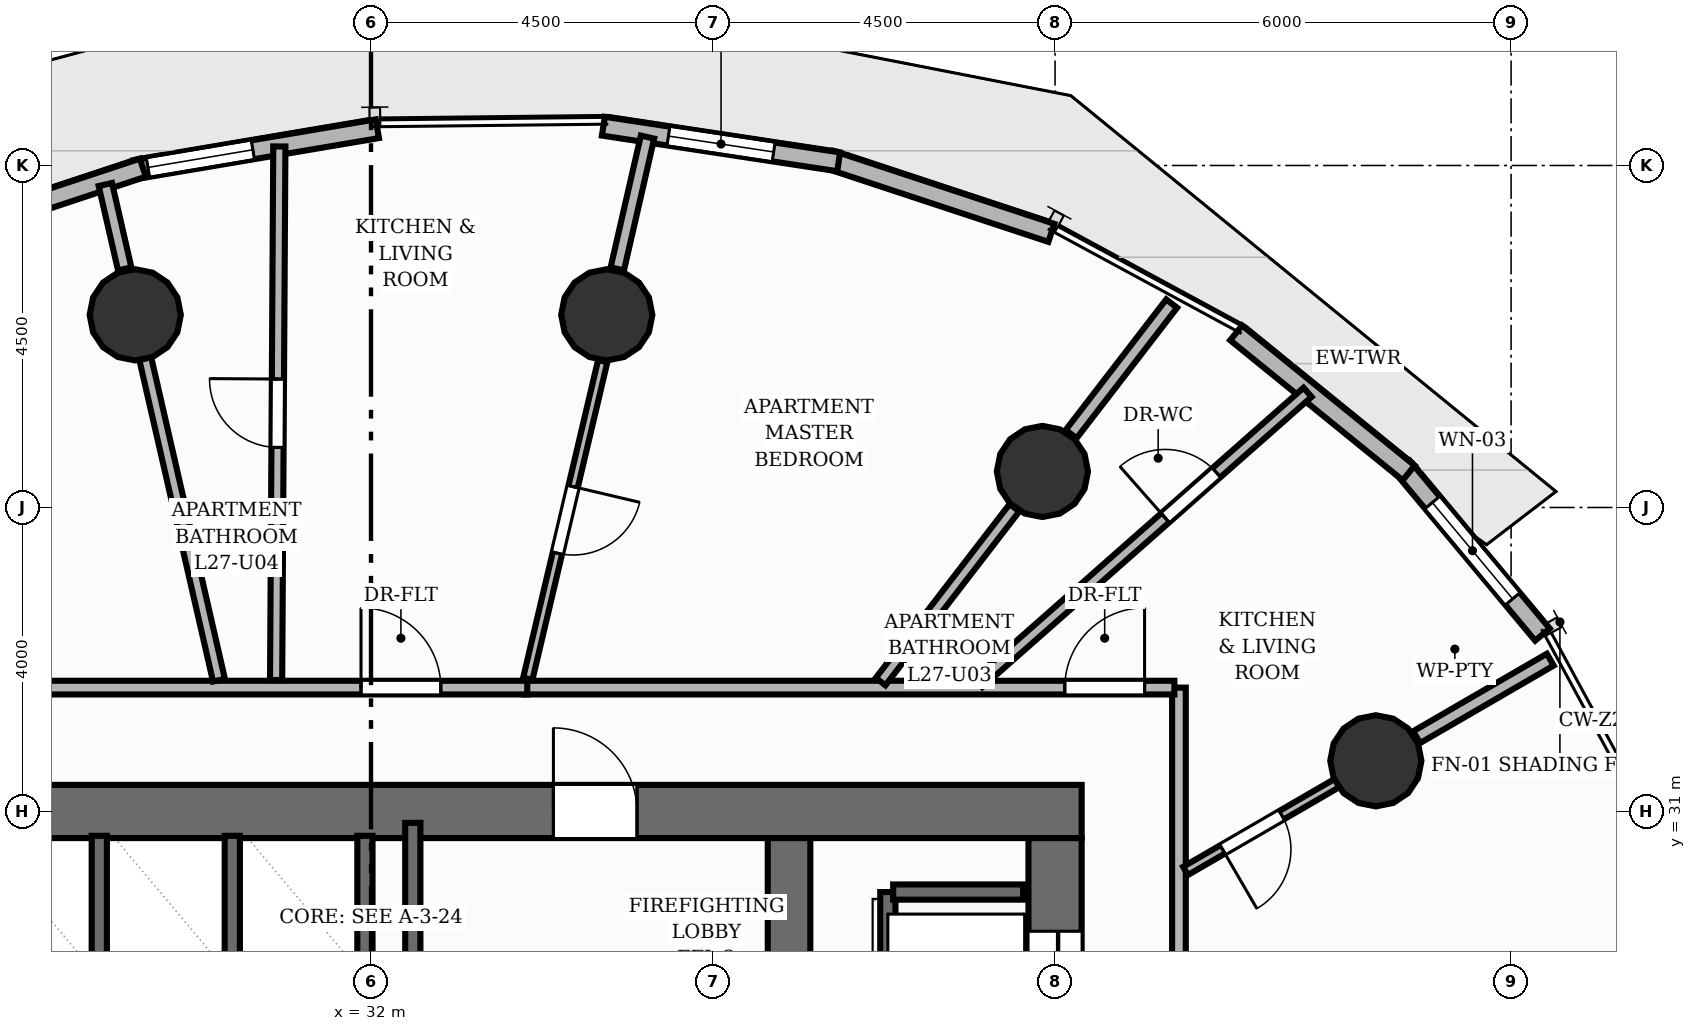
"""IFC4 building model, lengths in metres.
Left out: names, types, materials, properties, quantities, classifications, styles, units other than length and angle.
Written with IfcOpenShell. Run it as: python <this file> out.ifc"""

import sys

from ifc_helpers import new_model, si_unit, direction, frame, frame_2d, origin, origin_2d, place, context, subcontext, project, spatial, rectangle, circle, extrude, element, fill, save


model = new_model("IFC4")
c1 = context("Model", 3, precision=1e-05, world=origin(), true_north=direction((0.0, 1.0)))
c2 = subcontext(c1, "Body", "Model", "MODEL_VIEW")
j1 = project(units=[si_unit("LENGTHUNIT", "METRE"), si_unit("PLANEANGLEUNIT", "RADIAN")], contexts=[c1])
p1 = place(None, origin())
s1 = spatial("IfcSite", under=j1, at=p1, CompositionType="ELEMENT")
p2 = place(p1, origin())
s2 = spatial("IfcBuilding", under=s1, at=p2, CompositionType="ELEMENT")
p3 = place(p2, frame((0.0, 0.0, 93.28)))
s3 = spatial("IfcBuildingStorey", under=s2, at=p3, CompositionType="ELEMENT", Elevation=93.28)
p4 = place(p3, frame((22.65, 31.0, 0.0), z_axis=(0.0, 0.0, 1.0), x_axis=(1.0, 0.0, 0.0)))
e1 = element("IfcWall", 1, at=p4, inside=s3, PredefinedType="SHEAR", context=c2, shape_type="SweptSolid", body=[
    extrude(rectangle(XDim=18.7, YDim=0.7, at=frame_2d((9.35, 0.0))), origin(), (0.0, 0.0, 1.0), 3.2),
])
p5 = place(p4, frame((11.75, 0.0, 0.0)))
e2 = element("IfcOpeningElement", 2, at=p5, cuts=e1, PredefinedType="OPENING", context=c2, shape_type="SweptSolid", body=[
    extrude(rectangle(XDim=1.1, YDim=2.15, at=frame_2d((0.55, 1.075))), frame((0.0, 0.36, 0.0), z_axis=(0.0, -1.0, 0.0), x_axis=(1.0, 0.0, 0.0)), (0.0, 0.0, 1.0), 0.72),
])
p6 = place(p3, frame((41.0, 17.35, 0.0), z_axis=(0.0, 0.0, 1.0), x_axis=(0.0, 1.0, 0.0)))
e3 = element("IfcWall", 3, at=p6, inside=s3, PredefinedType="SHEAR", context=c2, shape_type="SweptSolid", body=[
    extrude(rectangle(XDim=13.3, YDim=0.7, at=frame_2d((6.65, 0.0))), origin(), (0.0, 0.0, 1.0), 3.2),
])
p7 = place(p6, frame((1.225, 0.0, 0.0)))
e4 = element("IfcOpeningElement", 4, at=p7, cuts=e3, PredefinedType="OPENING", context=c2, shape_type="SweptSolid", body=[
    extrude(rectangle(XDim=1.05, YDim=2.15, at=frame_2d((0.525, 1.075))), frame((0.0, 0.36, 0.0), z_axis=(0.0, -1.0, 0.0), x_axis=(1.0, 0.0, 0.0)), (0.0, 0.0, 1.0), 0.72),
])
p8 = place(p6, frame((4.475, 0.0, 0.0)))
e5 = element("IfcOpeningElement", 5, at=p8, cuts=e3, PredefinedType="OPENING", context=c2, shape_type="SweptSolid", body=[
    extrude(rectangle(XDim=1.05, YDim=2.15, at=frame_2d((0.525, 1.075))), frame((0.0, 0.36, 0.0), z_axis=(0.0, -1.0, 0.0), x_axis=(1.0, 0.0, 0.0)), (0.0, 0.0, 1.0), 0.72),
])
p9 = place(p6, frame((7.775, 0.0, 0.0)))
e6 = element("IfcOpeningElement", 6, at=p9, cuts=e3, PredefinedType="OPENING", context=c2, shape_type="SweptSolid", body=[
    extrude(rectangle(XDim=1.05, YDim=2.15, at=frame_2d((0.525, 1.075))), frame((0.0, 0.36, 0.0), z_axis=(0.0, -1.0, 0.0), x_axis=(1.0, 0.0, 0.0)), (0.0, 0.0, 1.0), 0.72),
])
p10 = place(p6, frame((11.025, 0.0, 0.0)))
e7 = element("IfcOpeningElement", 7, at=p10, cuts=e3, PredefinedType="OPENING", context=c2, shape_type="SweptSolid", body=[
    extrude(rectangle(XDim=1.05, YDim=2.15, at=frame_2d((0.525, 1.075))), frame((0.0, 0.36, 0.0), z_axis=(0.0, -1.0, 0.0), x_axis=(1.0, 0.0, 0.0)), (0.0, 0.0, 1.0), 0.72),
])
p11 = place(p3, frame((37.5, 17.35, 0.0), z_axis=(0.0, 0.0, 1.0), x_axis=(0.0, 1.0, 0.0)))
e8 = element("IfcWall", 8, at=p11, inside=s3, PredefinedType="SHEAR", context=c2, shape_type="SweptSolid", body=[
    extrude(rectangle(XDim=13.3, YDim=0.56, at=frame_2d((6.65, 0.0))), origin(), (0.0, 0.0, 1.0), 3.2),
])
for number, where, z_axis, x_axis in (
    (9, (45.22, 31.667, 0.0), (0.0, 0.0, 1.0), (1.0, 0.0, 0.0)),
    (10, (40.833, 35.474, 0.0), (0.0, 0.0, 1.0), (1.0, 0.0, 0.0)),
    (11, (35.102, 37.535, 0.0), (0.0, 0.0, 1.0), (1.0, 0.0, 0.0)),
    (12, (28.898, 37.535, 0.0), (0.0, 0.0, 1.0), (1.0, 0.0, 0.0)),
):
    element("IfcColumn", number, at=place(p3, frame(where, z_axis=z_axis, x_axis=x_axis)), inside=s3, PredefinedType="COLUMN", context=c2, shape_type="SweptSolid", body=[
        extrude(circle(Radius=0.6, at=origin_2d()), origin(), (0.0, 0.0, 1.0), 3.2),
    ])
p12 = place(p3, frame((45.572, 35.535, 0.0), z_axis=(0.0, 0.0, 1.0), x_axis=(0.640518566271, -0.76794268423, 0.0)))
e13 = element("IfcWall", 13, at=p12, inside=s3, PredefinedType="SOLIDWALL", context=c2, shape_type="SweptSolid", body=[
    extrude(rectangle(XDim=2.874, YDim=0.25, at=frame_2d((1.437, 0.0))), origin(), (0.0, 0.0, 1.0), 2.96),
])
p13 = place(p12, frame((0.612, 0.0, 0.85)))
e14 = element("IfcOpeningElement", 14, at=p13, cuts=e13, PredefinedType="OPENING", context=c2, shape_type="SweptSolid", body=[
    extrude(rectangle(XDim=1.65, YDim=1.55, at=frame_2d((0.825, 0.775))), frame((0.0, 0.135, 0.0), z_axis=(0.0, -1.0, 0.0), x_axis=(1.0, 0.0, 0.0)), (0.0, 0.0, 1.0), 0.27),
])
p14 = place(p3, frame((43.383, 37.298, 0.0), z_axis=(0.0, 0.0, 1.0), x_axis=(0.776285131062, -0.630381943976, 0.0)))
e15 = element("IfcWall", 15, at=p14, inside=s3, PredefinedType="SOLIDWALL", context=c2, shape_type="SweptSolid", body=[
    extrude(rectangle(XDim=2.923, YDim=0.25, at=frame_2d((1.462, 0.0))), origin(), (0.0, 0.0, 1.0), 2.96),
])
p15 = place(p3, frame((38.045, 39.574, 0.0), z_axis=(0.0, 0.0, 1.0), x_axis=(0.949533409058, -0.313665913166, 0.0)))
e16 = element("IfcWall", 16, at=p15, inside=s3, PredefinedType="SOLIDWALL", context=c2, shape_type="SweptSolid", body=[
    extrude(rectangle(XDim=3.061, YDim=0.25, at=frame_2d((1.53, 0.0))), origin(), (0.0, 0.0, 1.0), 2.96),
])
p16 = place(p3, frame((35.057, 40.017, 0.0), z_axis=(0.0, 0.0, 1.0), x_axis=(0.988719703222, -0.149777663425, 0.0)))
e17 = element("IfcWall", 17, at=p16, inside=s3, PredefinedType="SOLIDWALL", context=c2, shape_type="SweptSolid", body=[
    extrude(rectangle(XDim=3.131, YDim=0.25, at=frame_2d((1.566, 0.0))), origin(), (0.0, 0.0, 1.0), 2.96),
])
p17 = place(p16, frame((0.866, 0.0, 0.85)))
e18 = element("IfcOpeningElement", 18, at=p17, cuts=e17, PredefinedType="OPENING", context=c2, shape_type="SweptSolid", body=[
    extrude(rectangle(XDim=1.4, YDim=1.37, at=frame_2d((0.7, 0.685))), frame((0.0, 0.135, 0.0), z_axis=(0.0, -1.0, 0.0), x_axis=(1.0, 0.0, 0.0)), (0.0, 0.0, 1.0), 0.27),
])
p18 = place(p3, frame((28.893, 39.445, 0.0), z_axis=(0.0, 0.0, 1.0), x_axis=(0.986043062305, 0.166490478044, 0.0)))
e19 = element("IfcWall", 19, at=p18, inside=s3, PredefinedType="SOLIDWALL", context=c2, shape_type="SweptSolid", body=[
    extrude(rectangle(XDim=3.236, YDim=0.25, at=frame_2d((1.618, 0.0))), origin(), (0.0, 0.0, 1.0), 2.96),
])
p19 = place(p18, frame((0.175, 0.0, 0.85)))
e20 = element("IfcOpeningElement", 20, at=p19, cuts=e19, PredefinedType="OPENING", context=c2, shape_type="SweptSolid", body=[
    extrude(rectangle(XDim=1.4, YDim=1.55, at=frame_2d((0.7, 0.775))), frame((0.0, 0.135, 0.0), z_axis=(0.0, -1.0, 0.0), x_axis=(1.0, 0.0, 0.0)), (0.0, 0.0, 1.0), 0.27),
])
p20 = place(p3, frame((25.904, 38.445, 0.0), z_axis=(0.0, 0.0, 1.0), x_axis=(0.949206293356, 0.314654433709, 0.0)))
e21 = element("IfcWall", 21, at=p20, inside=s3, PredefinedType="SOLIDWALL", context=c2, shape_type="SweptSolid", body=[
    extrude(rectangle(XDim=3.26, YDim=0.25, at=frame_2d((1.63, 0.0))), origin(), (0.0, 0.0, 1.0), 2.96),
])
p21 = place(p3, frame((32.55, 27.35, 0.0), z_axis=(0.0, 0.0, 1.0), x_axis=(0.0, 1.0, 0.0)))
e22 = element("IfcWall", 22, at=p21, inside=s3, PredefinedType="SHEAR", context=c2, shape_type="SweptSolid", body=[
    extrude(rectangle(XDim=3.5, YDim=0.2, at=frame_2d((1.75, 0.0))), origin(), (0.0, 0.0, 1.0), 3.2),
])
p22 = place(p3, frame((38.8, 18.06, 0.0), z_axis=(0.0, 0.0, 1.0), x_axis=(0.0, 1.0, 0.0)))
e23 = element("IfcWall", 23, at=p22, inside=s3, PredefinedType="SHEAR", context=c2, shape_type="SweptSolid", body=[
    extrude(rectangle(XDim=11.88, YDim=0.2, at=frame_2d((5.94, 0.0))), origin(), (0.0, 0.0, 1.0), 3.2),
])
p23 = place(p3, frame((38.87, 29.94, 0.0), z_axis=(0.0, 0.0, 1.0), x_axis=(1.0, 0.0, 0.0)))
e24 = element("IfcWall", 24, at=p23, inside=s3, PredefinedType="SHEAR", context=c2, shape_type="SweptSolid", body=[
    extrude(rectangle(XDim=1.71, YDim=0.2, at=frame_2d((0.855, 0.0))), origin(), (0.0, 0.0, 1.0), 3.2),
])
for number, where, z_axis, x_axis in (
    (25, (31.92, 29.02, 0.0), (0.0, 0.0, 1.0), (0.0, 1.0, 0.0)),
    (26, (28.425, 29.02, 0.0), (0.0, 0.0, 1.0), (0.0, 1.0, 0.0)),
    (27, (30.175, 29.02, 0.0), (0.0, 0.0, 1.0), (0.0, 1.0, 0.0)),
):
    element("IfcWall", number, at=place(p3, frame(where, z_axis=z_axis, x_axis=x_axis)), inside=s3, PredefinedType="SHEAR", context=c2, shape_type="SweptSolid", body=[
        extrude(rectangle(XDim=1.66, YDim=0.2, at=frame_2d((0.83, 0.0))), origin(), (0.0, 0.0, 1.0), 3.2),
    ])
p24 = place(p3, frame((45.757, 31.978, 0.0), z_axis=(0.0, 0.0, 1.0), x_axis=(0.865025978628, 0.501727073516, 0.0)))
e28 = element("IfcWall", 28, at=p24, inside=s3, PredefinedType="PARTITIONING", context=c2, shape_type="SweptSolid", body=[
    extrude(rectangle(XDim=2.033, YDim=0.18, at=frame_2d((1.017, 0.0))), origin(), (0.0, 0.0, 1.0), 2.26),
])
p25 = place(p3, frame((41.212, 35.966, 0.0), z_axis=(0.0, 0.0, 1.0), x_axis=(0.610026423006, 0.792381071981, 0.0)))
e29 = element("IfcWall", 29, at=p25, inside=s3, PredefinedType="PARTITIONING", context=c2, shape_type="SweptSolid", body=[
    extrude(rectangle(XDim=2.167, YDim=0.18, at=frame_2d((1.084, 0.0))), origin(), (0.0, 0.0, 1.0), 2.26),
])
p26 = place(p3, frame((35.24, 38.139, 0.0), z_axis=(0.0, 0.0, 1.0), x_axis=(0.223406034992, 0.974725470853, 0.0)))
e30 = element("IfcWall", 30, at=p26, inside=s3, PredefinedType="PARTITIONING", context=c2, shape_type="SweptSolid", body=[
    extrude(rectangle(XDim=1.779, YDim=0.18, at=frame_2d((0.89, 0.0))), origin(), (0.0, 0.0, 1.0), 2.26),
])
p27 = place(p3, frame((28.76, 38.139, 0.0), z_axis=(0.0, 0.0, 1.0), x_axis=(-0.223325248633, 0.974743983476, 0.0)))
e31 = element("IfcWall", 31, at=p27, inside=s3, PredefinedType="PARTITIONING", context=c2, shape_type="SweptSolid", body=[
    extrude(rectangle(XDim=1.139, YDim=0.18, at=frame_2d((0.57, 0.0))), origin(), (0.0, 0.0, 1.0), 2.26),
])
p28 = place(p3, frame((42.63, 32.63, 0.0), z_axis=(0.0, 0.0, 1.0), x_axis=(0.0, -1.0, 0.0)))
e32 = element("IfcWall", 32, at=p28, inside=s3, PredefinedType="PARTITIONING", context=c2, shape_type="SweptSolid", body=[
    extrude(rectangle(XDim=6.23, YDim=0.18, at=frame_2d((3.115, 0.0))), origin(), (0.0, 0.0, 1.0), 2.955),
])
p29 = place(p3, frame((34.015, 32.63, 0.0), z_axis=(0.0, 0.0, 1.0), x_axis=(1.0, 0.0, 0.0)))
e33 = element("IfcWall", 33, at=p29, inside=s3, PredefinedType="PARTITIONING", context=c2, shape_type="SweptSolid", body=[
    extrude(rectangle(XDim=8.555, YDim=0.18, at=frame_2d((4.277, 0.0))), origin(), (0.0, 0.0, 1.0), 2.955),
])
p30 = place(p29, frame((7.112, 0.0, 0.0)))
e34 = element("IfcOpeningElement", 34, at=p30, cuts=e33, PredefinedType="OPENING", context=c2, shape_type="SweptSolid", body=[
    extrude(rectangle(XDim=1.05, YDim=2.15, at=frame_2d((0.525, 1.075))), frame((0.0, 0.1, 0.0), z_axis=(0.0, -1.0, 0.0), x_axis=(1.0, 0.0, 0.0)), (0.0, 0.0, 1.0), 0.2),
])
p31 = place(p3, frame((21.37, 32.63, 0.0), z_axis=(0.0, 0.0, 1.0), x_axis=(1.0, 0.0, 0.0)))
e35 = element("IfcWall", 35, at=p31, inside=s3, PredefinedType="PARTITIONING", context=c2, shape_type="SweptSolid", body=[
    extrude(rectangle(XDim=12.686, YDim=0.18, at=frame_2d((6.343, 0.0))), origin(), (0.0, 0.0, 1.0), 2.955),
])
p32 = place(p31, frame((10.499, 0.0, 0.0)))
e36 = element("IfcOpeningElement", 36, at=p32, cuts=e35, PredefinedType="OPENING", context=c2, shape_type="SweptSolid", body=[
    extrude(rectangle(XDim=1.05, YDim=2.15, at=frame_2d((0.525, 1.075))), frame((0.0, 0.1, 0.0), z_axis=(0.0, -1.0, 0.0), x_axis=(1.0, 0.0, 0.0)), (0.0, 0.0, 1.0), 0.2),
])
p33 = place(p31, frame((4.713, 0.0, 0.0)))
e37 = element("IfcOpeningElement", 37, at=p33, cuts=e35, PredefinedType="OPENING", context=c2, shape_type="SweptSolid", body=[
    extrude(rectangle(XDim=1.05, YDim=2.15, at=frame_2d((0.525, 1.075))), frame((0.0, 0.1, 0.0), z_axis=(0.0, -1.0, 0.0), x_axis=(1.0, 0.0, 0.0)), (0.0, 0.0, 1.0), 0.2),
])
p34 = place(p3, frame((39.991, 32.696, 0.0), z_axis=(0.0, 0.0, 1.0), x_axis=(0.750059872717, 0.661369932292, 0.0)))
e38 = element("IfcWall", 38, at=p34, inside=s3, PredefinedType="PLUMBINGWALL", context=c2, shape_type="SweptSolid", body=[
    extrude(rectangle(XDim=5.775, YDim=0.16, at=frame_2d((2.888, 0.0))), origin(), (0.0, 0.0, 1.0), 2.955),
])
p35 = place(p34, frame((3.278, 0.0, 0.0)))
e39 = element("IfcOpeningElement", 39, at=p35, cuts=e38, PredefinedType="OPENING", context=c2, shape_type="SweptSolid", body=[
    extrude(rectangle(XDim=0.9, YDim=2.1, at=frame_2d((0.45, 1.05))), frame((0.0, 0.09, 0.0), z_axis=(0.0, -1.0, 0.0), x_axis=(1.0, 0.0, 0.0)), (0.0, 0.0, 1.0), 0.18),
])
p36 = place(p3, frame((44.711, 31.375, 0.0), z_axis=(0.0, 0.0, 1.0), x_axis=(-0.864966854608, -0.501828995207, 0.0)))
e40 = element("IfcWall", 40, at=p36, inside=s3, PredefinedType="PARTITIONING", context=c2, shape_type="SweptSolid", body=[
    extrude(rectangle(XDim=2.306, YDim=0.125, at=frame_2d((1.153, 0.0))), origin(), (0.0, 0.0, 1.0), 2.26),
])
p37 = place(p36, frame((0.843, 0.0, 0.0)))
e41 = element("IfcOpeningElement", 41, at=p37, cuts=e40, PredefinedType="OPENING", context=c2, shape_type="SweptSolid", body=[
    extrude(rectangle(XDim=0.9, YDim=2.1, at=frame_2d((0.45, 1.05))), frame((0.0, 0.073, 0.0), z_axis=(0.0, -1.0, 0.0), x_axis=(1.0, 0.0, 0.0)), (0.0, 0.0, 1.0), 0.145),
])
p38 = place(p3, frame((38.705, 32.709, 0.0), z_axis=(0.0, 0.0, 1.0), x_axis=(0.610033601295, 0.792375545617, 0.0)))
e42 = element("IfcWall", 42, at=p38, inside=s3, PredefinedType="PLUMBINGWALL", context=c2, shape_type="SweptSolid", body=[
    extrude(rectangle(XDim=2.887, YDim=0.16, at=frame_2d((1.443, 0.0))), origin(), (0.0, 0.0, 1.0), 2.26),
])
p39 = place(p3, frame((30.752, 32.73, 0.0), z_axis=(0.0, 0.0, 1.0), x_axis=(0.006016026892, 0.999981903546, 0.0)))
e43 = element("IfcWall", 43, at=p39, inside=s3, PredefinedType="PLUMBINGWALL", context=c2, shape_type="SweptSolid", body=[
    extrude(rectangle(XDim=7.021, YDim=0.16, at=frame_2d((3.51, 0.0))), origin(), (0.0, 0.0, 1.0), 2.955),
])
p40 = place(p39, frame((3.06, 0.0, 0.0)))
e44 = element("IfcOpeningElement", 44, at=p40, cuts=e43, PredefinedType="OPENING", context=c2, shape_type="SweptSolid", body=[
    extrude(rectangle(XDim=0.9, YDim=2.1, at=frame_2d((0.45, 1.05))), frame((0.0, 0.09, 0.0), z_axis=(0.0, -1.0, 0.0), x_axis=(1.0, 0.0, 0.0)), (0.0, 0.0, 1.0), 0.18),
])
p41 = place(p3, frame((35.049, 36.927, 0.0), z_axis=(0.0, 0.0, 1.0), x_axis=(-0.229552612231, -0.973296254086, 0.0)))
e45 = element("IfcWall", 45, at=p41, inside=s3, PredefinedType="PARTITIONING", context=c2, shape_type="SweptSolid", body=[
    extrude(rectangle(XDim=4.295, YDim=0.125, at=frame_2d((2.147, 0.0))), origin(), (0.0, 0.0, 1.0), 2.26),
])
p42 = place(p41, frame((1.698, 0.0, 0.0)))
e46 = element("IfcOpeningElement", 46, at=p42, cuts=e45, PredefinedType="OPENING", context=c2, shape_type="SweptSolid", body=[
    extrude(rectangle(XDim=0.9, YDim=2.1, at=frame_2d((0.45, 1.05))), frame((0.0, 0.073, 0.0), z_axis=(0.0, -1.0, 0.0), x_axis=(1.0, 0.0, 0.0)), (0.0, 0.0, 1.0), 0.145),
])
p43 = place(p3, frame((30.0, 32.728, 0.0), z_axis=(0.0, 0.0, 1.0), x_axis=(-0.223409547543, 0.974724665773, 0.0)))
e47 = element("IfcWall", 47, at=p43, inside=s3, PredefinedType="PLUMBINGWALL", context=c2, shape_type="SweptSolid", body=[
    extrude(rectangle(XDim=4.342, YDim=0.16, at=frame_2d((2.171, 0.0))), origin(), (0.0, 0.0, 1.0), 2.26),
])
p44 = place(p13, origin())
e48 = element("IfcWindow", 48, at=p44, inside=s3, PartitioningType="SINGLE_PANEL", PredefinedType="WINDOW", context=c2, shape_type="SweptSolid", body=[
    extrude(rectangle(XDim=1.65, YDim=1.55, at=frame_2d((0.825, 0.775))), frame((0.0, 0.03, 0.0), z_axis=(0.0, -1.0, 0.0), x_axis=(1.0, 0.0, 0.0)), (0.0, 0.0, 1.0), 0.06),
])
fill(e14, e48)
p45 = place(p17, origin())
e49 = element("IfcWindow", 49, at=p45, inside=s3, PartitioningType="SINGLE_PANEL", PredefinedType="WINDOW", context=c2, shape_type="SweptSolid", body=[
    extrude(rectangle(XDim=1.4, YDim=1.37, at=frame_2d((0.7, 0.685))), frame((0.0, 0.03, 0.0), z_axis=(0.0, -1.0, 0.0), x_axis=(1.0, 0.0, 0.0)), (0.0, 0.0, 1.0), 0.06),
])
fill(e18, e49)
p46 = place(p19, origin())
e50 = element("IfcWindow", 50, at=p46, inside=s3, PartitioningType="SINGLE_PANEL", PredefinedType="WINDOW", context=c2, shape_type="SweptSolid", body=[
    extrude(rectangle(XDim=1.4, YDim=1.55, at=frame_2d((0.7, 0.775))), frame((0.0, 0.03, 0.0), z_axis=(0.0, -1.0, 0.0), x_axis=(1.0, 0.0, 0.0)), (0.0, 0.0, 1.0), 0.06),
])
fill(e20, e50)
p47 = place(p5, origin())
e51 = element("IfcDoor", 51, at=p47, inside=s3, OperationType="SINGLE_SWING_LEFT", PredefinedType="DOOR", context=c2, shape_type="SweptSolid", body=[
    extrude(rectangle(XDim=1.1, YDim=2.15, at=frame_2d((0.55, 1.075))), frame((0.0, 0.025, 0.0), z_axis=(0.0, -1.0, 0.0), x_axis=(1.0, 0.0, 0.0)), (0.0, 0.0, 1.0), 0.05),
])
fill(e2, e51)
p48 = place(p10, origin())
e52 = element("IfcDoor", 52, at=p48, inside=s3, OperationType="DOUBLE_DOOR_SLIDING", PredefinedType="DOOR", context=c2, shape_type="SweptSolid", body=[
    extrude(rectangle(XDim=1.05, YDim=2.15, at=frame_2d((0.525, 1.075))), frame((0.0, 0.025, 0.0), z_axis=(0.0, -1.0, 0.0), x_axis=(1.0, 0.0, 0.0)), (0.0, 0.0, 1.0), 0.05),
])
fill(e7, e52)
p49 = place(p30, origin())
e53 = element("IfcDoor", 53, at=p49, inside=s3, OperationType="SINGLE_SWING_RIGHT", PredefinedType="DOOR", context=c2, shape_type="SweptSolid", body=[
    extrude(rectangle(XDim=1.05, YDim=2.15, at=frame_2d((0.525, 1.075))), frame((0.0, 0.025, 0.0), z_axis=(0.0, -1.0, 0.0), x_axis=(1.0, 0.0, 0.0)), (0.0, 0.0, 1.0), 0.05),
])
fill(e34, e53)
p50 = place(p35, origin())
e54 = element("IfcDoor", 54, at=p50, inside=s3, OperationType="SINGLE_SWING_LEFT", PredefinedType="DOOR", context=c2, shape_type="SweptSolid", body=[
    extrude(rectangle(XDim=0.9, YDim=2.1, at=frame_2d((0.45, 1.05))), frame((0.0, 0.025, 0.0), z_axis=(0.0, -1.0, 0.0), x_axis=(1.0, 0.0, 0.0)), (0.0, 0.0, 1.0), 0.05),
])
fill(e39, e54)
p51 = place(p37, origin())
e55 = element("IfcDoor", 55, at=p51, inside=s3, OperationType="SINGLE_SWING_RIGHT", PredefinedType="DOOR", context=c2, shape_type="SweptSolid", body=[
    extrude(rectangle(XDim=0.9, YDim=2.1, at=frame_2d((0.45, 1.05))), frame((0.0, 0.025, 0.0), z_axis=(0.0, -1.0, 0.0), x_axis=(1.0, 0.0, 0.0)), (0.0, 0.0, 1.0), 0.05),
])
fill(e41, e55)
p52 = place(p32, origin())
e56 = element("IfcDoor", 56, at=p52, inside=s3, OperationType="SINGLE_SWING_LEFT", PredefinedType="DOOR", context=c2, shape_type="SweptSolid", body=[
    extrude(rectangle(XDim=1.05, YDim=2.15, at=frame_2d((0.525, 1.075))), frame((0.0, 0.025, 0.0), z_axis=(0.0, -1.0, 0.0), x_axis=(1.0, 0.0, 0.0)), (0.0, 0.0, 1.0), 0.05),
])
fill(e36, e56)
p53 = place(p40, origin())
e57 = element("IfcDoor", 57, at=p53, inside=s3, OperationType="SINGLE_SWING_RIGHT", PredefinedType="DOOR", context=c2, shape_type="SweptSolid", body=[
    extrude(rectangle(XDim=0.9, YDim=2.1, at=frame_2d((0.45, 1.05))), frame((0.0, 0.025, 0.0), z_axis=(0.0, -1.0, 0.0), x_axis=(1.0, 0.0, 0.0)), (0.0, 0.0, 1.0), 0.05),
])
fill(e44, e57)
p54 = place(p42, origin())
e58 = element("IfcDoor", 58, at=p54, inside=s3, OperationType="SINGLE_SWING_LEFT", PredefinedType="DOOR", context=c2, shape_type="SweptSolid", body=[
    extrude(rectangle(XDim=0.9, YDim=2.1, at=frame_2d((0.45, 1.05))), frame((0.0, 0.025, 0.0), z_axis=(0.0, -1.0, 0.0), x_axis=(1.0, 0.0, 0.0)), (0.0, 0.0, 1.0), 0.05),
])
fill(e46, e58)
save(model, sys.argv[1])
